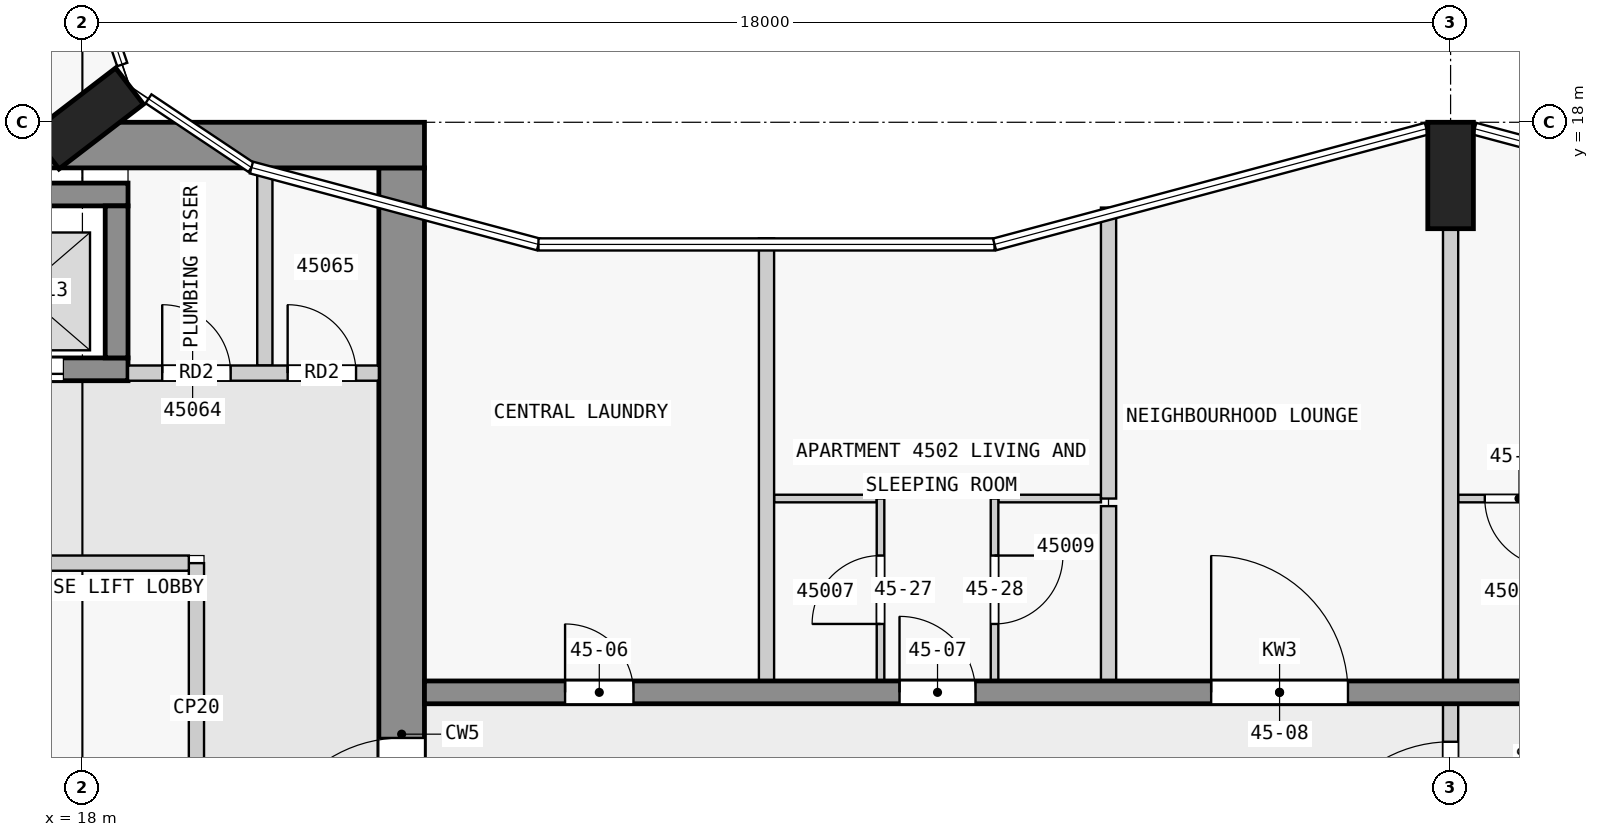
"""IFC4 building model, lengths in metres.
Left out: names, types, materials, properties, quantities, classifications, styles, units other than length and angle.
Written with IfcOpenShell. Run it as: python <this file> out.ifc"""

import sys

from ifc_helpers import new_model, si_unit, direction, frame, frame_2d, origin, origin_2d, place, context, subcontext, project, spatial, rectangle, extrude, element, fill, save


model = new_model("IFC4")
c1 = context("Model", 3, precision=1e-05, world=origin(), true_north=direction((0.0, 1.0)))
c2 = subcontext(c1, "Body", "Model", "MODEL_VIEW")
j1 = project(units=[si_unit("LENGTHUNIT", "METRE"), si_unit("PLANEANGLEUNIT", "RADIAN")], contexts=[c1])
p1 = place(None, origin())
s1 = spatial("IfcSite", under=j1, at=p1, CompositionType="ELEMENT")
p2 = place(p1, origin())
s2 = spatial("IfcBuilding", under=s1, at=p2, CompositionType="ELEMENT")
p3 = place(p2, frame((0.0, 0.0, 174.4)))
s3 = spatial("IfcBuildingStorey", under=s2, at=p3, CompositionType="ELEMENT", Elevation=174.4)
for number, where, z_axis, x_axis in (
    (1, (36.0, 17.3, 0.0), (0.0, 0.0, 1.0), (1.0, 0.0, 0.0)),
    (2, (18.065, 18.05, 0.0), (0.0, 0.0, 1.0), (-0.609, 0.793, 0.0)),
):
    element("IfcColumn", number, at=place(p3, frame(where, z_axis=z_axis, x_axis=x_axis)), inside=s3, PredefinedType="COLUMN", context=c2, shape_type="SweptSolid", body=[
        extrude(rectangle(XDim=0.6, YDim=1.4, at=origin_2d()), origin(), (0.0, 0.0, 1.0), 3.5),
    ])
p4 = place(p3, frame((1.38, 17.7, 0.0), z_axis=(0.0, 0.0, 1.0), x_axis=(1.0, 0.0, 0.0)))
e3 = element("IfcWall", 3, at=p4, inside=s3, PredefinedType="SHEAR", context=c2, shape_type="SweptSolid", body=[
    extrude(rectangle(XDim=21.12, YDim=0.6, at=frame_2d((10.56, 0.0))), origin(), (0.0, 0.0, 1.0), 3.25),
])
p5 = place(p4, frame((6.4, 0.0, 0.0)))
e4 = element("IfcOpeningElement", 4, at=p5, cuts=e3, PredefinedType="OPENING", context=c2, shape_type="SweptSolid", body=[
    extrude(rectangle(XDim=1.8, YDim=2.1, at=frame_2d((0.9, 1.05))), frame((0.0, 0.31, 0.0), z_axis=(0.0, -1.0, 0.0), x_axis=(1.0, 0.0, 0.0)), (0.0, 0.0, 1.0), 0.62),
])
p6 = place(p3, frame((22.2, 2.5, 0.0), z_axis=(0.0, 0.0, 1.0), x_axis=(0.0, 1.0, 0.0)))
e5 = element("IfcWall", 5, at=p6, inside=s3, PredefinedType="SHEAR", context=c2, shape_type="SweptSolid", body=[
    extrude(rectangle(XDim=14.9, YDim=0.6, at=frame_2d((7.45, 0.0))), origin(), (0.0, 0.0, 1.0), 3.25),
])
p7 = place(p6, frame((5.6, 0.0, 0.0)))
e6 = element("IfcOpeningElement", 6, at=p7, cuts=e5, PredefinedType="OPENING", context=c2, shape_type="SweptSolid", body=[
    extrude(rectangle(XDim=1.8, YDim=2.1, at=frame_2d((0.9, 1.05))), frame((0.0, 0.31, 0.0), z_axis=(0.0, -1.0, 0.0), x_axis=(1.0, 0.0, 0.0)), (0.0, 0.0, 1.0), 0.62),
])
p8 = place(p3, frame((10.8, 17.05, 0.0), z_axis=(0.0, 0.0, 1.0), x_axis=(1.0, 0.0, 0.0)))
e7 = element("IfcWall", 7, at=p8, inside=s3, PredefinedType="SHEAR", context=c2, shape_type="SweptSolid", body=[
    extrude(rectangle(XDim=7.8, YDim=0.3, at=frame_2d((3.9, 0.0))), origin(), (0.0, 0.0, 1.0), 3.25),
])
p9 = place(p3, frame((10.8, 14.75, 0.0), z_axis=(0.0, 0.0, 1.0), x_axis=(1.0, 0.0, 0.0)))
e8 = element("IfcWall", 8, at=p9, inside=s3, PredefinedType="SHEAR", context=c2, shape_type="SweptSolid", body=[
    extrude(rectangle(XDim=7.8, YDim=0.3, at=frame_2d((3.9, 0.0))), origin(), (0.0, 0.0, 1.0), 3.25),
])
p10 = place(p9, frame((0.85, 0.0, 0.0)))
e9 = element("IfcOpeningElement", 9, at=p10, cuts=e8, PredefinedType="OPENING", context=c2, shape_type="SweptSolid", body=[
    extrude(rectangle(XDim=1.1, YDim=2.1, at=frame_2d((0.55, 1.05))), frame((0.0, 0.16, 0.0), z_axis=(0.0, -1.0, 0.0), x_axis=(1.0, 0.0, 0.0)), (0.0, 0.0, 1.0), 0.32),
])
p11 = place(p9, frame((3.35, 0.0, 0.0)))
e10 = element("IfcOpeningElement", 10, at=p11, cuts=e8, PredefinedType="OPENING", context=c2, shape_type="SweptSolid", body=[
    extrude(rectangle(XDim=1.1, YDim=2.1, at=frame_2d((0.55, 1.05))), frame((0.0, 0.16, 0.0), z_axis=(0.0, -1.0, 0.0), x_axis=(1.0, 0.0, 0.0)), (0.0, 0.0, 1.0), 0.32),
])
p12 = place(p9, frame((5.85, 0.0, 0.0)))
e11 = element("IfcOpeningElement", 11, at=p12, cuts=e8, PredefinedType="OPENING", context=c2, shape_type="SweptSolid", body=[
    extrude(rectangle(XDim=1.1, YDim=2.1, at=frame_2d((0.55, 1.05))), frame((0.0, 0.16, 0.0), z_axis=(0.0, -1.0, 0.0), x_axis=(1.0, 0.0, 0.0)), (0.0, 0.0, 1.0), 0.32),
])
p13 = place(p3, frame((18.45, 14.9, 0.0), z_axis=(0.0, 0.0, 1.0), x_axis=(0.0, 1.0, 0.0)))
e12 = element("IfcWall", 12, at=p13, inside=s3, PredefinedType="SHEAR", context=c2, shape_type="SweptSolid", body=[
    extrude(rectangle(XDim=2.0, YDim=0.3, at=frame_2d((1.0, 0.0))), origin(), (0.0, 0.0, 1.0), 3.25),
])
p14 = place(p3, frame((22.5, 10.5, 0.0), z_axis=(0.0, 0.0, 1.0), x_axis=(1.0, 0.0, 0.0)))
e13 = element("IfcWall", 13, at=p14, inside=s3, PredefinedType="SHEAR", context=c2, shape_type="SweptSolid", body=[
    extrude(rectangle(XDim=22.5, YDim=0.3, at=frame_2d((11.25, 0.0))), origin(), (0.0, 0.0, 1.0), 3.25),
])
p15 = place(p14, frame((1.85, 0.0, 0.0)))
e14 = element("IfcOpeningElement", 14, at=p15, cuts=e13, PredefinedType="OPENING", context=c2, shape_type="SweptSolid", body=[
    extrude(rectangle(XDim=0.9, YDim=2.1, at=frame_2d((0.45, 1.05))), frame((0.0, 0.16, 0.0), z_axis=(0.0, -1.0, 0.0), x_axis=(1.0, 0.0, 0.0)), (0.0, 0.0, 1.0), 0.32),
])
p16 = place(p14, frame((6.25, 0.0, 0.0)))
e15 = element("IfcOpeningElement", 15, at=p16, cuts=e13, PredefinedType="OPENING", context=c2, shape_type="SweptSolid", body=[
    extrude(rectangle(XDim=1.0, YDim=2.1, at=frame_2d((0.5, 1.05))), frame((0.0, 0.16, 0.0), z_axis=(0.0, -1.0, 0.0), x_axis=(1.0, 0.0, 0.0)), (0.0, 0.0, 1.0), 0.32),
])
p17 = place(p14, frame((10.35, 0.0, 0.0)))
e16 = element("IfcOpeningElement", 16, at=p17, cuts=e13, PredefinedType="OPENING", context=c2, shape_type="SweptSolid", body=[
    extrude(rectangle(XDim=1.8, YDim=2.1, at=frame_2d((0.9, 1.05))), frame((0.0, 0.16, 0.0), z_axis=(0.0, -1.0, 0.0), x_axis=(1.0, 0.0, 0.0)), (0.0, 0.0, 1.0), 0.32),
])
p18 = place(p14, frame((16.85, 0.0, 0.0)))
e17 = element("IfcOpeningElement", 17, at=p18, cuts=e13, PredefinedType="OPENING", context=c2, shape_type="SweptSolid", body=[
    extrude(rectangle(XDim=1.0, YDim=2.1, at=frame_2d((0.5, 1.05))), frame((0.0, 0.16, 0.0), z_axis=(0.0, -1.0, 0.0), x_axis=(1.0, 0.0, 0.0)), (0.0, 0.0, 1.0), 0.32),
])
p19 = place(p3, frame((19.5, 8.4, 0.0), z_axis=(0.0, 0.0, 1.0), x_axis=(0.0, 1.0, 0.0)))
e18 = element("IfcWall", 18, at=p19, inside=s3, PredefinedType="PARTITIONING", context=c2, shape_type="SweptSolid", body=[
    extrude(rectangle(XDim=3.8, YDim=0.2, at=frame_2d((1.9, 0.0))), origin(), (0.0, 0.0, 1.0), 3.25),
])
p20 = place(p3, frame((10.9, 12.2, 0.0), z_axis=(0.0, 0.0, 1.0), x_axis=(1.0, 0.0, 0.0)))
e19 = element("IfcWall", 19, at=p20, inside=s3, PredefinedType="PARTITIONING", context=c2, shape_type="SweptSolid", body=[
    extrude(rectangle(XDim=8.5, YDim=0.2, at=frame_2d((4.25, 0.0))), origin(), (0.0, 0.0, 1.0), 3.25),
])
p21 = place(p20, frame((3.8, 0.0, 0.0)))
e20 = element("IfcOpeningElement", 20, at=p21, cuts=e19, PredefinedType="OPENING", context=c2, shape_type="SweptSolid", body=[
    extrude(rectangle(XDim=0.9, YDim=2.1, at=frame_2d((0.45, 1.05))), frame((0.0, 0.11, 0.0), z_axis=(0.0, -1.0, 0.0), x_axis=(1.0, 0.0, 0.0)), (0.0, 0.0, 1.0), 0.22),
])
p22 = place(p3, frame((18.6, 14.7, 0.0), z_axis=(0.0, 0.0, 1.0), x_axis=(1.0, 0.0, 0.0)))
e21 = element("IfcWall", 21, at=p22, inside=s3, PredefinedType="PARTITIONING", context=c2, shape_type="SweptSolid", body=[
    extrude(rectangle(XDim=3.3, YDim=0.2, at=frame_2d((1.65, 0.0))), origin(), (0.0, 0.0, 1.0), 3.25),
])
p23 = place(p22, frame((0.45, 0.0, 0.0)))
e22 = element("IfcOpeningElement", 22, at=p23, cuts=e21, PredefinedType="OPENING", context=c2, shape_type="SweptSolid", body=[
    extrude(rectangle(XDim=0.9, YDim=2.1, at=frame_2d((0.45, 1.05))), frame((0.0, 0.11, 0.0), z_axis=(0.0, -1.0, 0.0), x_axis=(1.0, 0.0, 0.0)), (0.0, 0.0, 1.0), 0.22),
])
p24 = place(p22, frame((2.1, 0.0, 0.0)))
e23 = element("IfcOpeningElement", 23, at=p24, cuts=e21, PredefinedType="OPENING", context=c2, shape_type="SweptSolid", body=[
    extrude(rectangle(XDim=0.9, YDim=2.1, at=frame_2d((0.45, 1.05))), frame((0.0, 0.11, 0.0), z_axis=(0.0, -1.0, 0.0), x_axis=(1.0, 0.0, 0.0)), (0.0, 0.0, 1.0), 0.22),
])
p25 = place(p3, frame((20.4, 14.8, 0.0), z_axis=(0.0, 0.0, 1.0), x_axis=(0.0, 1.0, 0.0)))
e24 = element("IfcWall", 24, at=p25, inside=s3, PredefinedType="PARTITIONING", context=c2, shape_type="SweptSolid", body=[
    extrude(rectangle(XDim=2.6, YDim=0.2, at=frame_2d((1.3, 0.0))), origin(), (0.0, 0.0, 1.0), 3.25),
])
for number, where, z_axis, x_axis in (
    (25, (28.45, 13.05, 0.0), (0.0, 0.0, 1.0), (-1.0, 0.0, 0.0)),
    (26, (31.4, 13.05, 0.0), (0.0, 0.0, 1.0), (-1.0, 0.0, 0.0)),
):
    element("IfcWall", number, at=place(p3, frame(where, z_axis=z_axis, x_axis=x_axis)), inside=s3, PredefinedType="PARTITIONING", context=c2, shape_type="SweptSolid", body=[
        extrude(rectangle(XDim=1.35, YDim=0.1, at=frame_2d((0.675, 0.0))), origin(), (0.0, 0.0, 1.0), 3.25),
    ])
p26 = place(p3, frame((39.1, 13.05, 0.0), z_axis=(0.0, 0.0, 1.0), x_axis=(-1.0, 0.0, 0.0)))
e27 = element("IfcWall", 27, at=p26, inside=s3, PredefinedType="PARTITIONING", context=c2, shape_type="SweptSolid", body=[
    extrude(rectangle(XDim=3.0, YDim=0.1, at=frame_2d((1.5, 0.0))), origin(), (0.0, 0.0, 1.0), 3.25),
])
p27 = place(p26, frame((1.75, 0.0, 0.0)))
e28 = element("IfcOpeningElement", 28, at=p27, cuts=e27, PredefinedType="OPENING", context=c2, shape_type="SweptSolid", body=[
    extrude(rectangle(XDim=0.9, YDim=2.1, at=frame_2d((0.45, 1.05))), frame((0.0, 0.06, 0.0), z_axis=(0.0, -1.0, 0.0), x_axis=(1.0, 0.0, 0.0)), (0.0, 0.0, 1.0), 0.12),
])
p28 = place(p3, frame((27.0, 10.65, 0.0), z_axis=(0.0, 0.0, 1.0), x_axis=(0.0, 1.0, 0.0)))
e29 = element("IfcWall", 29, at=p28, inside=s3, PredefinedType="PARTITIONING", context=c2, shape_type="SweptSolid", body=[
    extrude(rectangle(XDim=5.823, YDim=0.2, at=frame_2d((2.912, 0.0))), origin(), (0.0, 0.0, 1.0), 3.25),
])
p29 = place(p3, frame((28.5, 10.65, 0.0), z_axis=(0.0, 0.0, 1.0), x_axis=(0.0, 1.0, 0.0)))
e30 = element("IfcWall", 30, at=p29, inside=s3, PredefinedType="PARTITIONING", context=c2, shape_type="SweptSolid", body=[
    extrude(rectangle(XDim=2.4, YDim=0.1, at=frame_2d((1.2, 0.0))), origin(), (0.0, 0.0, 1.0), 3.25),
])
p30 = place(p29, frame((0.75, 0.0, 0.0)))
e31 = element("IfcOpeningElement", 31, at=p30, cuts=e30, PredefinedType="OPENING", context=c2, shape_type="SweptSolid", body=[
    extrude(rectangle(XDim=0.9, YDim=2.1, at=frame_2d((0.45, 1.05))), frame((0.0, 0.06, 0.0), z_axis=(0.0, -1.0, 0.0), x_axis=(1.0, 0.0, 0.0)), (0.0, 0.0, 1.0), 0.12),
])
p31 = place(p3, frame((30.0, 13.05, 0.0), z_axis=(0.0, 0.0, 1.0), x_axis=(0.0, -1.0, 0.0)))
e32 = element("IfcWall", 32, at=p31, inside=s3, PredefinedType="PARTITIONING", context=c2, shape_type="SweptSolid", body=[
    extrude(rectangle(XDim=2.4, YDim=0.1, at=frame_2d((1.2, 0.0))), origin(), (0.0, 0.0, 1.0), 3.25),
])
p32 = place(p31, frame((0.75, 0.0, 0.0)))
e33 = element("IfcOpeningElement", 33, at=p32, cuts=e32, PredefinedType="OPENING", context=c2, shape_type="SweptSolid", body=[
    extrude(rectangle(XDim=0.9, YDim=2.1, at=frame_2d((0.45, 1.05))), frame((0.0, 0.06, 0.0), z_axis=(0.0, -1.0, 0.0), x_axis=(1.0, 0.0, 0.0)), (0.0, 0.0, 1.0), 0.12),
])
p33 = place(p3, frame((31.5, 16.878, 0.0), z_axis=(0.0, 0.0, 1.0), x_axis=(0.0, -1.0, 0.0)))
e34 = element("IfcWall", 34, at=p33, inside=s3, PredefinedType="PARTITIONING", context=c2, shape_type="SweptSolid", body=[
    extrude(rectangle(XDim=3.828, YDim=0.2, at=frame_2d((1.914, 0.0))), origin(), (0.0, 0.0, 1.0), 3.25),
])
p34 = place(p3, frame((31.5, 10.65, 0.0), z_axis=(0.0, 0.0, 1.0), x_axis=(0.0, 1.0, 0.0)))
e35 = element("IfcWall", 35, at=p34, inside=s3, PredefinedType="PARTITIONING", context=c2, shape_type="SweptSolid", body=[
    extrude(rectangle(XDim=2.3, YDim=0.2, at=frame_2d((1.15, 0.0))), origin(), (0.0, 0.0, 1.0), 3.25),
])
p35 = place(p3, frame((36.0, 10.65, 0.0), z_axis=(0.0, 0.0, 1.0), x_axis=(0.0, 1.0, 0.0)))
e36 = element("IfcWall", 36, at=p35, inside=s3, PredefinedType="PARTITIONING", context=c2, shape_type="SweptSolid", body=[
    extrude(rectangle(XDim=5.95, YDim=0.2, at=frame_2d((2.975, 0.0))), origin(), (0.0, 0.0, 1.0), 3.25),
])
p36 = place(p3, frame((36.0, 7.35, 0.0), z_axis=(0.0, 0.0, 1.0), x_axis=(0.0, 1.0, 0.0)))
e37 = element("IfcWall", 37, at=p36, inside=s3, PredefinedType="PARTITIONING", context=c2, shape_type="SweptSolid", body=[
    extrude(rectangle(XDim=3.2, YDim=0.2, at=frame_2d((1.6, 0.0))), origin(), (0.0, 0.0, 1.0), 3.25),
])
p37 = place(p36, frame((0.7, 0.0, 0.0)))
e38 = element("IfcOpeningElement", 38, at=p37, cuts=e37, PredefinedType="OPENING", context=c2, shape_type="SweptSolid", body=[
    extrude(rectangle(XDim=1.8, YDim=2.1, at=frame_2d((0.9, 1.05))), frame((0.0, 0.11, 0.0), z_axis=(0.0, -1.0, 0.0), x_axis=(1.0, 0.0, 0.0)), (0.0, 0.0, 1.0), 0.22),
])
p38 = place(p12, origin())
e39 = element("IfcDoor", 39, at=p38, inside=s3, OperationType="DOUBLE_DOOR_SLIDING", PredefinedType="DOOR", context=c2, shape_type="SweptSolid", body=[
    extrude(rectangle(XDim=1.1, YDim=2.1, at=frame_2d((0.55, 1.05))), frame((0.0, 0.025, 0.0), z_axis=(0.0, -1.0, 0.0), x_axis=(1.0, 0.0, 0.0)), (0.0, 0.0, 1.0), 0.05),
])
fill(e11, e39)
p39 = place(p7, origin())
e40 = element("IfcDoor", 40, at=p39, inside=s3, OperationType="DOUBLE_DOOR_SINGLE_SWING", PredefinedType="DOOR", context=c2, shape_type="SweptSolid", body=[
    extrude(rectangle(XDim=1.8, YDim=2.1, at=frame_2d((0.9, 1.05))), frame((0.0, 0.025, 0.0), z_axis=(0.0, -1.0, 0.0), x_axis=(1.0, 0.0, 0.0)), (0.0, 0.0, 1.0), 0.05),
])
fill(e6, e40)
p40 = place(p23, origin())
e41 = element("IfcDoor", 41, at=p40, inside=s3, OperationType="SINGLE_SWING_LEFT", PredefinedType="DOOR", context=c2, shape_type="SweptSolid", body=[
    extrude(rectangle(XDim=0.9, YDim=2.1, at=frame_2d((0.45, 1.05))), frame((0.0, 0.025, 0.0), z_axis=(0.0, -1.0, 0.0), x_axis=(1.0, 0.0, 0.0)), (0.0, 0.0, 1.0), 0.05),
])
fill(e22, e41)
p41 = place(p24, origin())
e42 = element("IfcDoor", 42, at=p41, inside=s3, OperationType="SINGLE_SWING_LEFT", PredefinedType="DOOR", context=c2, shape_type="SweptSolid", body=[
    extrude(rectangle(XDim=0.9, YDim=2.1, at=frame_2d((0.45, 1.05))), frame((0.0, 0.025, 0.0), z_axis=(0.0, -1.0, 0.0), x_axis=(1.0, 0.0, 0.0)), (0.0, 0.0, 1.0), 0.05),
])
fill(e23, e42)
p42 = place(p15, origin())
e43 = element("IfcDoor", 43, at=p42, inside=s3, OperationType="SINGLE_SWING_LEFT", PredefinedType="DOOR", context=c2, shape_type="SweptSolid", body=[
    extrude(rectangle(XDim=0.9, YDim=2.1, at=frame_2d((0.45, 1.05))), frame((0.0, 0.025, 0.0), z_axis=(0.0, -1.0, 0.0), x_axis=(1.0, 0.0, 0.0)), (0.0, 0.0, 1.0), 0.05),
])
fill(e14, e43)
p43 = place(p16, origin())
e44 = element("IfcDoor", 44, at=p43, inside=s3, OperationType="SINGLE_SWING_LEFT", PredefinedType="DOOR", context=c2, shape_type="SweptSolid", body=[
    extrude(rectangle(XDim=1.0, YDim=2.1, at=frame_2d((0.5, 1.05))), frame((0.0, 0.025, 0.0), z_axis=(0.0, -1.0, 0.0), x_axis=(1.0, 0.0, 0.0)), (0.0, 0.0, 1.0), 0.05),
])
fill(e15, e44)
p44 = place(p17, origin())
e45 = element("IfcDoor", 45, at=p44, inside=s3, OperationType="SINGLE_SWING_LEFT", PredefinedType="DOOR", context=c2, shape_type="SweptSolid", body=[
    extrude(rectangle(XDim=1.8, YDim=2.1, at=frame_2d((0.9, 1.05))), frame((0.0, 0.025, 0.0), z_axis=(0.0, -1.0, 0.0), x_axis=(1.0, 0.0, 0.0)), (0.0, 0.0, 1.0), 0.05),
])
fill(e16, e45)
p45 = place(p37, origin())
e46 = element("IfcDoor", 46, at=p45, inside=s3, OperationType="SINGLE_SWING_LEFT", PredefinedType="DOOR", context=c2, shape_type="SweptSolid", body=[
    extrude(rectangle(XDim=1.8, YDim=2.1, at=frame_2d((0.9, 1.05))), frame((0.0, 0.025, 0.0), z_axis=(0.0, -1.0, 0.0), x_axis=(1.0, 0.0, 0.0)), (0.0, 0.0, 1.0), 0.05),
])
fill(e38, e46)
p46 = place(p30, origin())
e47 = element("IfcDoor", 47, at=p46, inside=s3, OperationType="SINGLE_SWING_LEFT", PredefinedType="DOOR", context=c2, shape_type="SweptSolid", body=[
    extrude(rectangle(XDim=0.9, YDim=2.1, at=frame_2d((0.45, 1.05))), frame((0.0, 0.025, 0.0), z_axis=(0.0, -1.0, 0.0), x_axis=(1.0, 0.0, 0.0)), (0.0, 0.0, 1.0), 0.05),
])
fill(e31, e47)
p47 = place(p32, origin())
e48 = element("IfcDoor", 48, at=p47, inside=s3, OperationType="SINGLE_SWING_LEFT", PredefinedType="DOOR", context=c2, shape_type="SweptSolid", body=[
    extrude(rectangle(XDim=0.9, YDim=2.1, at=frame_2d((0.45, 1.05))), frame((0.0, 0.025, 0.0), z_axis=(0.0, -1.0, 0.0), x_axis=(1.0, 0.0, 0.0)), (0.0, 0.0, 1.0), 0.05),
])
fill(e33, e48)
p48 = place(p27, origin())
e49 = element("IfcDoor", 49, at=p48, inside=s3, OperationType="SINGLE_SWING_RIGHT", PredefinedType="DOOR", context=c2, shape_type="SweptSolid", body=[
    extrude(rectangle(XDim=0.9, YDim=2.1, at=frame_2d((0.45, 1.05))), frame((0.0, 0.025, 0.0), z_axis=(0.0, -1.0, 0.0), x_axis=(1.0, 0.0, 0.0)), (0.0, 0.0, 1.0), 0.05),
])
fill(e28, e49)
save(model, sys.argv[1])
